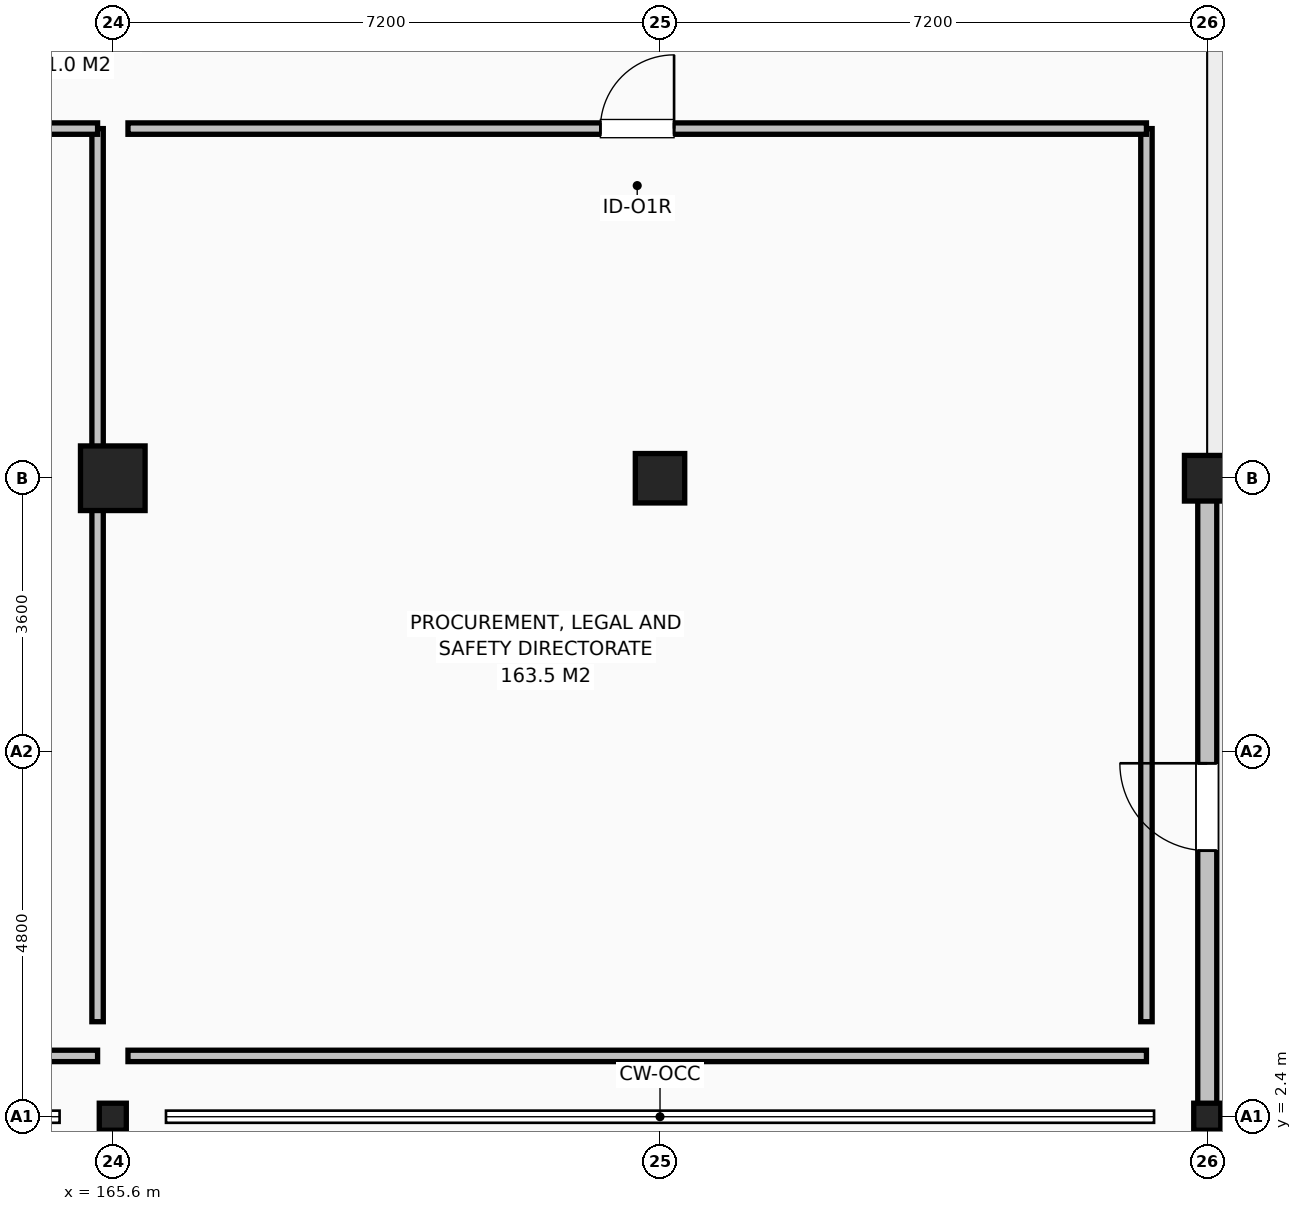
"""IFC4 building model, lengths in metres.
Left out: names, types, materials, properties, quantities, classifications, styles, units other than length and angle.
Written with IfcOpenShell. Run it as: python <this file> out.ifc"""

import sys

from ifc_helpers import new_model, si_unit, direction, frame, frame_2d, origin, origin_2d, place, context, subcontext, project, spatial, rectangle, circle, hollow_circle, extrude, element, fill, save


model = new_model("IFC4")
c1 = context("Model", 3, precision=1e-05, world=origin(), true_north=direction((0.0, 1.0)))
c2 = subcontext(c1, "Body", "Model", "MODEL_VIEW")
j1 = project(units=[si_unit("LENGTHUNIT", "METRE"), si_unit("PLANEANGLEUNIT", "RADIAN")], contexts=[c1])
p1 = place(None, origin())
s1 = spatial("IfcSite", under=j1, at=p1, CompositionType="ELEMENT")
p2 = place(p1, origin())
s2 = spatial("IfcBuilding", under=s1, at=p2, CompositionType="ELEMENT")
p3 = place(p2, frame((0.0, 0.0, 13.2)))
s3 = spatial("IfcBuildingStorey", under=s2, at=p3, CompositionType="ELEMENT", Elevation=13.2)
p4 = place(p3, frame((165.6, 10.8, 0.0), z_axis=(0.0, 0.0, 1.0), x_axis=(1.0, 0.0, 0.0)))
e1 = element("IfcColumn", 1, at=p4, inside=s3, PredefinedType="COLUMN", context=c2, shape_type="SweptSolid", body=[
    extrude(rectangle(XDim=0.85, YDim=0.85, at=origin_2d()), origin(), (0.0, 0.0, 1.0), 4.2),
])
p5 = place(p3, frame((172.8, 10.8, 0.0), z_axis=(0.0, 0.0, 1.0), x_axis=(1.0, 0.0, 0.0)))
e2 = element("IfcColumn", 2, at=p5, inside=s3, PredefinedType="COLUMN", context=c2, shape_type="SweptSolid", body=[
    extrude(rectangle(XDim=0.65, YDim=0.65, at=origin_2d()), origin(), (0.0, 0.0, 1.0), 4.2),
])
p6 = place(p3, frame((180.0, 10.8, 0.0), z_axis=(0.0, 0.0, 1.0), x_axis=(1.0, 0.0, 0.0)))
e3 = element("IfcColumn", 3, at=p6, inside=s3, PredefinedType="COLUMN", context=c2, shape_type="SweptSolid", body=[
    extrude(circle(Radius=0.3, at=origin_2d()), origin(), (0.0, 0.0, 1.0), 4.2),
])
for number, where, z_axis, x_axis in (
    (4, (165.6, 2.4, 0.0), (0.0, 0.0, 1.0), (1.0, 0.0, 0.0)),
    (5, (180.0, 2.4, 0.0), (0.0, 0.0, 1.0), (1.0, 0.0, 0.0)),
):
    element("IfcColumn", number, at=place(p3, frame(where, z_axis=z_axis, x_axis=x_axis)), inside=s3, PredefinedType="COLUMN", context=c2, shape_type="SweptSolid", body=[
        extrude(hollow_circle(Radius=0.178, WallThickness=0.013, at=origin_2d()), origin(), (0.0, 0.0, 1.0), 4.2),
    ])
p7 = place(p3, frame((180.0, 2.4, 0.0), z_axis=(0.0, 0.0, 1.0), x_axis=(0.0, 1.0, 0.0)))
e6 = element("IfcWall", 6, at=p7, inside=s3, PredefinedType="SOLIDWALL", context=c2, shape_type="SweptSolid", body=[
    extrude(rectangle(XDim=8.4, YDim=0.25, at=frame_2d((4.2, 0.0))), origin(), (0.0, 0.0, 1.0), 3.35),
])
p8 = place(p7, frame((3.5, 0.0, 0.0)))
e7 = element("IfcOpeningElement", 7, at=p8, cuts=e6, PredefinedType="OPENING", context=c2, shape_type="SweptSolid", body=[
    extrude(rectangle(XDim=1.15, YDim=2.15, at=frame_2d((0.575, 1.075))), frame((0.0, 0.135, 0.0), z_axis=(0.0, -1.0, 0.0), x_axis=(1.0, 0.0, 0.0)), (0.0, 0.0, 1.0), 0.27),
])
p9 = place(p3, frame((165.4, 3.2, 0.0), z_axis=(0.0, 0.0, 1.0), x_axis=(-1.0, 0.0, 0.0)))
e8 = element("IfcWall", 8, at=p9, inside=s3, PredefinedType="PARTITIONING", context=c2, shape_type="SweptSolid", body=[
    extrude(rectangle(XDim=35.6, YDim=0.15, at=frame_2d((17.8, 0.0))), origin(), (0.0, 0.0, 1.0), 3.479),
])
p10 = place(p3, frame((165.4, 3.65, 0.0), z_axis=(0.0, 0.0, 1.0), x_axis=(0.0, 1.0, 0.0)))
e9 = element("IfcWall", 9, at=p10, inside=s3, PredefinedType="PARTITIONING", context=c2, shape_type="SweptSolid", body=[
    extrude(rectangle(XDim=11.75, YDim=0.15, at=frame_2d((5.875, 0.0))), origin(), (0.0, 0.0, 1.0), 3.508),
])
p11 = place(p3, frame((129.8, 15.4, 0.0), z_axis=(0.0, 0.0, 1.0), x_axis=(1.0, 0.0, 0.0)))
e10 = element("IfcWall", 10, at=p11, inside=s3, PredefinedType="PARTITIONING", context=c2, shape_type="SweptSolid", body=[
    extrude(rectangle(XDim=35.6, YDim=0.15, at=frame_2d((17.8, 0.0))), origin(), (0.0, 0.0, 1.0), 3.479),
])
p12 = place(p11, frame((16.9, 0.0, 0.0)))
e11 = element("IfcOpeningElement", 11, at=p12, cuts=e10, PredefinedType="OPENING", context=c2, shape_type="SweptSolid", body=[
    extrude(rectangle(XDim=1.8, YDim=2.2, at=frame_2d((0.9, 1.1))), frame((0.0, 0.085, 0.0), z_axis=(0.0, -1.0, 0.0), x_axis=(1.0, 0.0, 0.0)), (0.0, 0.0, 1.0), 0.17),
])
p13 = place(p11, frame((30.6, 0.0, 0.0)))
e12 = element("IfcOpeningElement", 12, at=p13, cuts=e10, PredefinedType="OPENING", context=c2, shape_type="SweptSolid", body=[
    extrude(rectangle(XDim=1.8, YDim=2.2, at=frame_2d((0.9, 1.1))), frame((0.0, 0.085, 0.0), z_axis=(0.0, -1.0, 0.0), x_axis=(1.0, 0.0, 0.0)), (0.0, 0.0, 1.0), 0.17),
])
p14 = place(p3, frame((179.2, 3.2, 0.0), z_axis=(0.0, 0.0, 1.0), x_axis=(-1.0, 0.0, 0.0)))
e13 = element("IfcWall", 13, at=p14, inside=s3, PredefinedType="PARTITIONING", context=c2, shape_type="SweptSolid", body=[
    extrude(rectangle(XDim=13.4, YDim=0.15, at=frame_2d((6.7, 0.0))), origin(), (0.0, 0.0, 1.0), 3.6),
])
p15 = place(p3, frame((179.2, 3.65, 0.0), z_axis=(0.0, 0.0, 1.0), x_axis=(0.0, 1.0, 0.0)))
e14 = element("IfcWall", 14, at=p15, inside=s3, PredefinedType="PARTITIONING", context=c2, shape_type="SweptSolid", body=[
    extrude(rectangle(XDim=11.75, YDim=0.15, at=frame_2d((5.875, 0.0))), origin(), (0.0, 0.0, 1.0), 3.6),
])
p16 = place(p3, frame((165.8, 15.4, 0.0), z_axis=(0.0, 0.0, 1.0), x_axis=(1.0, 0.0, 0.0)))
e15 = element("IfcWall", 15, at=p16, inside=s3, PredefinedType="PARTITIONING", context=c2, shape_type="SweptSolid", body=[
    extrude(rectangle(XDim=13.4, YDim=0.15, at=frame_2d((6.7, 0.0))), origin(), (0.0, 0.0, 1.0), 3.6),
])
p17 = place(p16, frame((6.215, 0.0, 0.0)))
e16 = element("IfcOpeningElement", 16, at=p17, cuts=e15, PredefinedType="OPENING", context=c2, shape_type="SweptSolid", body=[
    extrude(rectangle(XDim=0.97, YDim=2.15, at=frame_2d((0.485, 1.075))), frame((0.0, 0.085, 0.0), z_axis=(0.0, -1.0, 0.0), x_axis=(1.0, 0.0, 0.0)), (0.0, 0.0, 1.0), 0.17),
])
p18 = place(p8, origin())
e17 = element("IfcDoor", 17, at=p18, inside=s3, OperationType="SINGLE_SWING_RIGHT", PredefinedType="DOOR", context=c2, shape_type="SweptSolid", body=[
    extrude(rectangle(XDim=1.15, YDim=2.15, at=frame_2d((0.575, 1.075))), frame((0.0, 0.025, 0.0), z_axis=(0.0, -1.0, 0.0), x_axis=(1.0, 0.0, 0.0)), (0.0, 0.0, 1.0), 0.05),
])
fill(e7, e17)
p19 = place(p17, origin())
e18 = element("IfcDoor", 18, at=p19, inside=s3, OperationType="SINGLE_SWING_RIGHT", PredefinedType="DOOR", context=c2, shape_type="SweptSolid", body=[
    extrude(rectangle(XDim=0.97, YDim=2.15, at=frame_2d((0.485, 1.075))), frame((0.0, 0.025, 0.0), z_axis=(0.0, -1.0, 0.0), x_axis=(1.0, 0.0, 0.0)), (0.0, 0.0, 1.0), 0.05),
])
fill(e16, e18)
save(model, sys.argv[1])
